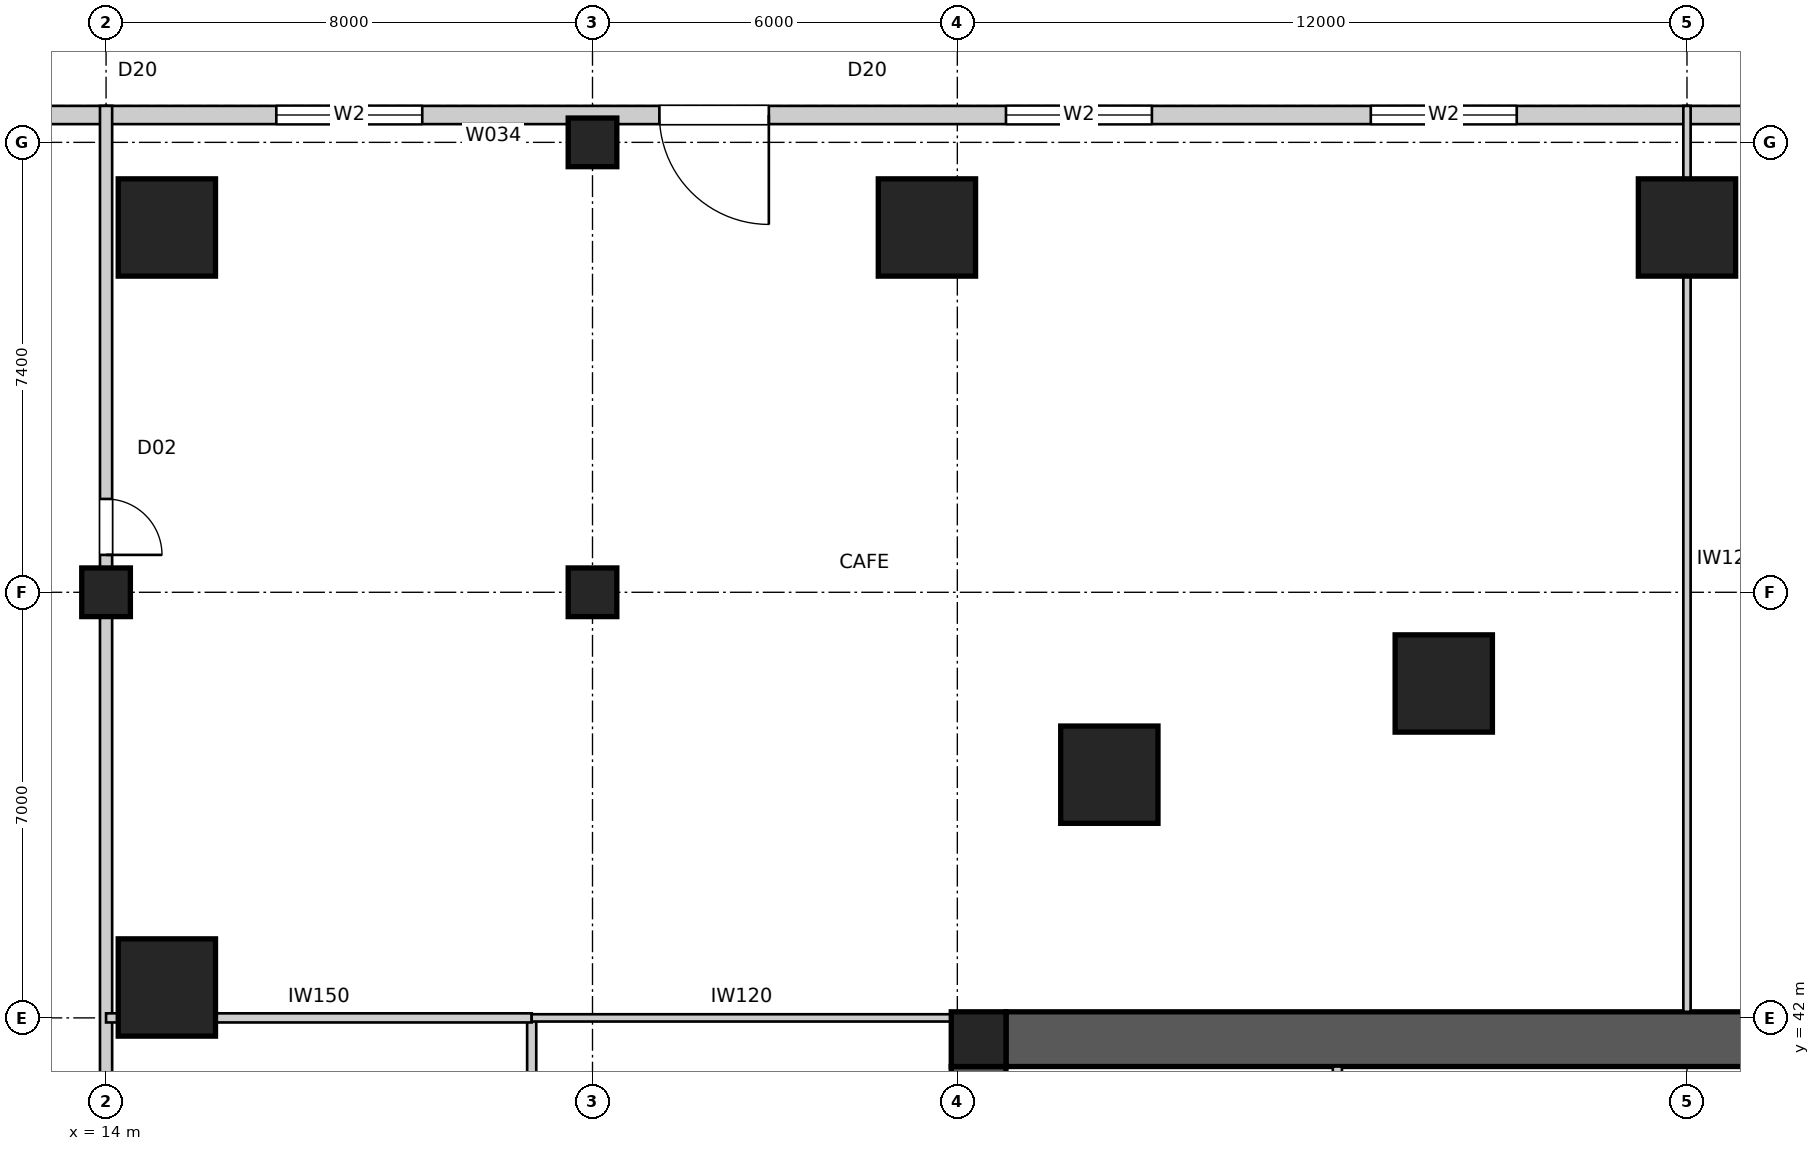
"""IFC4 building model, lengths in metres.
Left out: names, types, materials, properties, quantities, classifications, styles, units other than length and angle.
Written with IfcOpenShell. Run it as: python <this file> out.ifc"""

import sys

from ifc_helpers import new_model, si_unit, direction, frame, frame_2d, origin, origin_2d, place, context, subcontext, project, spatial, polyline, rectangle, outline, extrude, element, fill, save


model = new_model("IFC4")
c1 = context("Model", 3, precision=1e-05, world=origin(), true_north=direction((0.0, 1.0)))
c2 = subcontext(c1, "Body", "Model", "MODEL_VIEW")
j1 = project(units=[si_unit("LENGTHUNIT", "METRE"), si_unit("PLANEANGLEUNIT", "RADIAN")], contexts=[c1])
p1 = place(None, origin())
s1 = spatial("IfcSite", under=j1, at=p1, CompositionType="ELEMENT")
p2 = place(p1, origin())
s2 = spatial("IfcBuilding", under=s1, at=p2, CompositionType="ELEMENT")
p3 = place(p2, origin())
s3 = spatial("IfcBuildingStorey", under=s2, at=p3, CompositionType="ELEMENT", Elevation=0.0)
p4 = place(p3, frame((28.8, 41.65, 0.0), z_axis=(0.0, 0.0, 1.0), x_axis=(1.0, 0.0, 0.0)))
e1 = element("IfcWall", 1, at=p4, inside=s3, PredefinedType="SHEAR", context=c2, shape_type="SweptSolid", body=[
    extrude(outline(polyline([(0.0, -0.45), (22.4, -0.45), (22.4, -0.025), (22.85, -0.025), (22.85, 0.025), (22.4, 0.025), (22.4, 0.45), (0.0, 0.45), (0.0, 0.025), (-0.45, 0.025), (-0.45, -0.025), (0.0, -0.025), (0.0, -0.45)])), origin(), (0.0, 0.0, 1.0), 6.0),
])
p5 = place(p3, frame((28.35, 41.2, 0.0), z_axis=(0.0, 0.0, 1.0), x_axis=(0.0, -1.0, 0.0)))
e2 = element("IfcWall", 2, at=p5, inside=s3, PredefinedType="SHEAR", context=c2, shape_type="SweptSolid", body=[
    extrude(outline(polyline([(0.0, -0.45), (22.4, -0.45), (22.4, -0.025), (22.85, -0.025), (22.85, 0.025), (22.4, 0.025), (22.4, 0.45), (0.0, 0.45), (0.0, 0.025), (-0.45, 0.025), (-0.45, -0.025), (0.0, -0.025), (0.0, -0.45)])), origin(), (0.0, 0.0, 1.0), 6.0),
])
p6 = place(p5, frame((11.14, 0.0, 0.0)))
e3 = element("IfcOpeningElement", 3, at=p6, cuts=e2, PredefinedType="OPENING", context=c2, shape_type="SweptSolid", body=[
    extrude(rectangle(XDim=1.02, YDim=2.4, at=frame_2d((0.51, 1.2))), frame((0.0, 0.46, 0.0), z_axis=(0.0, -1.0, 0.0), x_axis=(1.0, 0.0, 0.0)), (0.0, 0.0, 1.0), 0.92),
])
p7 = place(p3, frame((28.35, 41.65, 0.0), z_axis=(0.0, 0.0, 1.0), x_axis=(1.0, 0.0, 0.0)))
e4 = element("IfcColumn", 4, at=p7, inside=s3, PredefinedType="COLUMN", context=c2, shape_type="SweptSolid", body=[
    extrude(rectangle(XDim=0.9, YDim=0.9, at=origin_2d()), origin(), (0.0, 0.0, 1.0), 6.0),
])
for number, where, z_axis, x_axis in (
    (5, (40.0, 55.0, 0.0), (0.0, 0.0, 1.0), (1.0, 0.0, 0.0)),
    (6, (27.5, 55.0, 0.0), (0.0, 0.0, 1.0), (1.0, 0.0, 0.0)),
    (7, (15.0, 55.0, 0.0), (0.0, 0.0, 1.0), (1.0, 0.0, 0.0)),
    (8, (15.0, 42.5, 0.0), (0.0, 0.0, 1.0), (1.0, 0.0, 0.0)),
):
    element("IfcColumn", number, at=place(p3, frame(where, z_axis=z_axis, x_axis=x_axis)), inside=s3, PredefinedType="COLUMN", context=c2, shape_type="SweptSolid", body=[
        extrude(rectangle(XDim=1.6, YDim=1.6, at=origin_2d()), origin(), (0.0, 0.0, 1.0), 6.0),
    ])
for number, where, z_axis, x_axis in (
    (9, (14.0, 49.0, 0.0), (0.0, 0.0, 1.0), (1.0, 0.0, 0.0)),
    (10, (22.0, 49.0, 0.0), (0.0, 0.0, 1.0), (1.0, 0.0, 0.0)),
    (11, (22.0, 56.4, 0.0), (0.0, 0.0, 1.0), (1.0, 0.0, 0.0)),
):
    element("IfcColumn", number, at=place(p3, frame(where, z_axis=z_axis, x_axis=x_axis)), inside=s3, PredefinedType="COLUMN", context=c2, shape_type="SweptSolid", body=[
        extrude(rectangle(XDim=0.8, YDim=0.8, at=origin_2d()), origin(), (0.0, 0.0, 1.0), 6.0),
    ])
for number, where, z_axis, x_axis in (
    (12, (36.0, 47.5, 0.0), (0.0, 0.0, 1.0), (1.0, 0.0, 0.0)),
    (13, (30.5, 46.0, 0.0), (0.0, 0.0, 1.0), (1.0, 0.0, 0.0)),
):
    element("IfcColumn", number, at=place(p3, frame(where, z_axis=z_axis, x_axis=x_axis)), inside=s3, PredefinedType="COLUMN", context=c2, shape_type="SweptSolid", body=[
        extrude(rectangle(XDim=1.6, YDim=1.6, at=origin_2d()), origin(), (0.0, 0.0, 1.0), 6.0),
    ])
p8 = place(p3, frame((66.0, 56.85, 0.0), z_axis=(0.0, 0.0, 1.0), x_axis=(-1.0, 0.0, 0.0)))
e14 = element("IfcWall", 14, at=p8, inside=s3, PredefinedType="SOLIDWALL", context=c2, shape_type="SweptSolid", body=[
    extrude(rectangle(XDim=26.0, YDim=0.3, at=frame_2d((13.0, 0.0))), origin(), (0.0, 0.0, 1.0), 5.65),
])
p9 = place(p8, frame((2.8, 0.0, 0.6)))
e15 = element("IfcOpeningElement", 15, at=p9, cuts=e14, PredefinedType="OPENING", context=c2, shape_type="SweptSolid", body=[
    extrude(rectangle(XDim=2.4, YDim=3.6, at=frame_2d((1.2, 1.8))), frame((0.0, 0.16, 0.0), z_axis=(0.0, -1.0, 0.0), x_axis=(1.0, 0.0, 0.0)), (0.0, 0.0, 1.0), 0.32),
])
p10 = place(p8, frame((8.8, 0.0, 0.6)))
e16 = element("IfcOpeningElement", 16, at=p10, cuts=e14, PredefinedType="OPENING", context=c2, shape_type="SweptSolid", body=[
    extrude(rectangle(XDim=2.4, YDim=3.6, at=frame_2d((1.2, 1.8))), frame((0.0, 0.16, 0.0), z_axis=(0.0, -1.0, 0.0), x_axis=(1.0, 0.0, 0.0)), (0.0, 0.0, 1.0), 0.32),
])
p11 = place(p8, frame((15.1, 0.0, 0.0)))
e17 = element("IfcOpeningElement", 17, at=p11, cuts=e14, PredefinedType="OPENING", context=c2, shape_type="SweptSolid", body=[
    extrude(rectangle(XDim=1.8, YDim=2.7, at=frame_2d((0.9, 1.35))), frame((0.0, 0.16, 0.0), z_axis=(0.0, -1.0, 0.0), x_axis=(1.0, 0.0, 0.0)), (0.0, 0.0, 1.0), 0.32),
])
p12 = place(p8, frame((20.8, 0.0, 0.6)))
e18 = element("IfcOpeningElement", 18, at=p12, cuts=e14, PredefinedType="OPENING", context=c2, shape_type="SweptSolid", body=[
    extrude(rectangle(XDim=2.4, YDim=3.6, at=frame_2d((1.2, 1.8))), frame((0.0, 0.16, 0.0), z_axis=(0.0, -1.0, 0.0), x_axis=(1.0, 0.0, 0.0)), (0.0, 0.0, 1.0), 0.32),
])
p13 = place(p3, frame((40.0, 56.85, 0.0), z_axis=(0.0, 0.0, 1.0), x_axis=(-1.0, 0.0, 0.0)))
e19 = element("IfcWall", 19, at=p13, inside=s3, PredefinedType="SOLIDWALL", context=c2, shape_type="SweptSolid", body=[
    extrude(rectangle(XDim=26.0, YDim=0.3, at=frame_2d((13.0, 0.0))), origin(), (0.0, 0.0, 1.0), 5.65),
])
p14 = place(p13, frame((2.8, 0.0, 0.6)))
e20 = element("IfcOpeningElement", 20, at=p14, cuts=e19, PredefinedType="OPENING", context=c2, shape_type="SweptSolid", body=[
    extrude(rectangle(XDim=2.4, YDim=3.6, at=frame_2d((1.2, 1.8))), frame((0.0, 0.16, 0.0), z_axis=(0.0, -1.0, 0.0), x_axis=(1.0, 0.0, 0.0)), (0.0, 0.0, 1.0), 0.32),
])
p15 = place(p13, frame((8.8, 0.0, 0.6)))
e21 = element("IfcOpeningElement", 21, at=p15, cuts=e19, PredefinedType="OPENING", context=c2, shape_type="SweptSolid", body=[
    extrude(rectangle(XDim=2.4, YDim=3.6, at=frame_2d((1.2, 1.8))), frame((0.0, 0.16, 0.0), z_axis=(0.0, -1.0, 0.0), x_axis=(1.0, 0.0, 0.0)), (0.0, 0.0, 1.0), 0.32),
])
p16 = place(p13, frame((15.1, 0.0, 0.0)))
e22 = element("IfcOpeningElement", 22, at=p16, cuts=e19, PredefinedType="OPENING", context=c2, shape_type="SweptSolid", body=[
    extrude(rectangle(XDim=1.8, YDim=2.7, at=frame_2d((0.9, 1.35))), frame((0.0, 0.16, 0.0), z_axis=(0.0, -1.0, 0.0), x_axis=(1.0, 0.0, 0.0)), (0.0, 0.0, 1.0), 0.32),
])
p17 = place(p13, frame((20.8, 0.0, 0.6)))
e23 = element("IfcOpeningElement", 23, at=p17, cuts=e19, PredefinedType="OPENING", context=c2, shape_type="SweptSolid", body=[
    extrude(rectangle(XDim=2.4, YDim=3.6, at=frame_2d((1.2, 1.8))), frame((0.0, 0.16, 0.0), z_axis=(0.0, -1.0, 0.0), x_axis=(1.0, 0.0, 0.0)), (0.0, 0.0, 1.0), 0.32),
])
p18 = place(p3, frame((14.0, 56.85, 0.0), z_axis=(0.0, 0.0, 1.0), x_axis=(-1.0, 0.0, 0.0)))
e24 = element("IfcWall", 24, at=p18, inside=s3, PredefinedType="SOLIDWALL", context=c2, shape_type="SweptSolid", body=[
    extrude(rectangle(XDim=12.0, YDim=0.3, at=frame_2d((6.0, 0.0))), origin(), (0.0, 0.0, 1.0), 5.65),
])
p19 = place(p18, frame((1.1, 0.0, 0.0)))
e25 = element("IfcOpeningElement", 25, at=p19, cuts=e24, PredefinedType="OPENING", context=c2, shape_type="SweptSolid", body=[
    extrude(rectangle(XDim=1.8, YDim=2.7, at=frame_2d((0.9, 1.35))), frame((0.0, 0.16, 0.0), z_axis=(0.0, -1.0, 0.0), x_axis=(1.0, 0.0, 0.0)), (0.0, 0.0, 1.0), 0.32),
])
p20 = place(p18, frame((5.1, 0.0, 0.0)))
e26 = element("IfcOpeningElement", 26, at=p20, cuts=e24, PredefinedType="OPENING", context=c2, shape_type="SweptSolid", body=[
    extrude(rectangle(XDim=1.8, YDim=2.7, at=frame_2d((0.9, 1.35))), frame((0.0, 0.16, 0.0), z_axis=(0.0, -1.0, 0.0), x_axis=(1.0, 0.0, 0.0)), (0.0, 0.0, 1.0), 0.32),
])
p21 = place(p18, frame((9.1, 0.0, 0.0)))
e27 = element("IfcOpeningElement", 27, at=p21, cuts=e24, PredefinedType="OPENING", context=c2, shape_type="SweptSolid", body=[
    extrude(rectangle(XDim=1.8, YDim=2.7, at=frame_2d((0.9, 1.35))), frame((0.0, 0.16, 0.0), z_axis=(0.0, -1.0, 0.0), x_axis=(1.0, 0.0, 0.0)), (0.0, 0.0, 1.0), 0.32),
])
p22 = place(p3, frame((34.25, 41.2, 0.0), z_axis=(0.0, 0.0, 1.0), x_axis=(0.0, -1.0, 0.0)))
e28 = element("IfcWall", 28, at=p22, inside=s3, PredefinedType="SOLIDWALL", context=c2, shape_type="SweptSolid", body=[
    extrude(rectangle(XDim=5.95, YDim=0.15, at=frame_2d((2.975, 0.0))), origin(), (0.0, 0.0, 1.0), 5.65),
])
p23 = place(p22, frame((2.515, 0.0, 0.0)))
e29 = element("IfcOpeningElement", 29, at=p23, cuts=e28, PredefinedType="OPENING", context=c2, shape_type="SweptSolid", body=[
    extrude(rectangle(XDim=0.92, YDim=2.1, at=frame_2d((0.46, 1.05))), frame((0.0, 0.085, 0.0), z_axis=(0.0, -1.0, 0.0), x_axis=(1.0, 0.0, 0.0)), (0.0, 0.0, 1.0), 0.17),
])
p24 = place(p3, frame((14.0, 57.0, 0.0), z_axis=(0.0, 0.0, 1.0), x_axis=(0.0, -1.0, 0.0)))
e30 = element("IfcWall", 30, at=p24, inside=s3, PredefinedType="PARTITIONING", context=c2, shape_type="SweptSolid", body=[
    extrude(rectangle(XDim=54.0, YDim=0.2, at=frame_2d((27.0, 0.0))), origin(), (0.0, 0.0, 1.0), 5.65),
])
p25 = place(p24, frame((29.49, 0.0, 0.0)))
e31 = element("IfcOpeningElement", 31, at=p25, cuts=e30, PredefinedType="OPENING", context=c2, shape_type="SweptSolid", body=[
    extrude(rectangle(XDim=1.02, YDim=2.4, at=frame_2d((0.51, 1.2))), frame((0.0, 0.11, 0.0), z_axis=(0.0, -1.0, 0.0), x_axis=(1.0, 0.0, 0.0)), (0.0, 0.0, 1.0), 0.22),
])
p26 = place(p24, frame((46.615, 0.0, 0.0)))
e32 = element("IfcOpeningElement", 32, at=p26, cuts=e30, PredefinedType="OPENING", context=c2, shape_type="SweptSolid", body=[
    extrude(rectangle(XDim=0.92, YDim=2.34, at=frame_2d((0.46, 1.17))), frame((0.0, 0.11, 0.0), z_axis=(0.0, -1.0, 0.0), x_axis=(1.0, 0.0, 0.0)), (0.0, 0.0, 1.0), 0.22),
])
p27 = place(p24, frame((6.465, 0.0, 0.0)))
e33 = element("IfcOpeningElement", 33, at=p27, cuts=e30, PredefinedType="OPENING", context=c2, shape_type="SweptSolid", body=[
    extrude(rectangle(XDim=0.92, YDim=2.34, at=frame_2d((0.46, 1.17))), frame((0.0, 0.11, 0.0), z_axis=(0.0, -1.0, 0.0), x_axis=(1.0, 0.0, 0.0)), (0.0, 0.0, 1.0), 0.22),
])
p28 = place(p24, frame((17.49, 0.0, 0.0)))
e34 = element("IfcOpeningElement", 34, at=p28, cuts=e30, PredefinedType="OPENING", context=c2, shape_type="SweptSolid", body=[
    extrude(rectangle(XDim=1.02, YDim=2.1, at=frame_2d((0.51, 1.05))), frame((0.0, 0.11, 0.0), z_axis=(0.0, -1.0, 0.0), x_axis=(1.0, 0.0, 0.0)), (0.0, 0.0, 1.0), 0.22),
])
p29 = place(p3, frame((21.0, 42.0, 0.0), z_axis=(0.0, 0.0, 1.0), x_axis=(0.0, -1.0, 0.0)))
e35 = element("IfcWall", 35, at=p29, inside=s3, PredefinedType="SOLIDWALL", context=c2, shape_type="SweptSolid", body=[
    extrude(rectangle(XDim=6.0, YDim=0.15, at=frame_2d((3.0, 0.0))), origin(), (0.0, 0.0, 1.0), 5.65),
])
p30 = place(p3, frame((14.0, 42.0, 0.0), z_axis=(0.0, 0.0, 1.0), x_axis=(1.0, 0.0, 0.0)))
e36 = element("IfcWall", 36, at=p30, inside=s3, PredefinedType="SOLIDWALL", context=c2, shape_type="SweptSolid", body=[
    extrude(rectangle(XDim=7.0, YDim=0.15, at=frame_2d((3.5, 0.0))), origin(), (0.0, 0.0, 1.0), 5.65),
])
p31 = place(p3, frame((21.0, 42.0, 0.0), z_axis=(0.0, 0.0, 1.0), x_axis=(1.0, 0.0, 0.0)))
e37 = element("IfcWall", 37, at=p31, inside=s3, PredefinedType="PARTITIONING", context=c2, shape_type="SweptSolid", body=[
    extrude(rectangle(XDim=6.9, YDim=0.12, at=frame_2d((3.45, 0.0))), origin(), (0.0, 0.0, 1.0), 5.65),
])
p32 = place(p3, frame((40.0, 57.0, 0.0), z_axis=(0.0, 0.0, 1.0), x_axis=(0.0, -1.0, 0.0)))
e38 = element("IfcWall", 38, at=p32, inside=s3, PredefinedType="PARTITIONING", context=c2, shape_type="SweptSolid", body=[
    extrude(rectangle(XDim=14.9, YDim=0.12, at=frame_2d((7.45, 0.0))), origin(), (0.0, 0.0, 1.0), 5.65),
])
p33 = place(p14, origin())
e39 = element("IfcWindow", 39, at=p33, inside=s3, PartitioningType="SINGLE_PANEL", PredefinedType="WINDOW", context=c2, shape_type="SweptSolid", body=[
    extrude(rectangle(XDim=2.4, YDim=3.6, at=frame_2d((1.2, 1.8))), frame((0.0, 0.03, 0.0), z_axis=(0.0, -1.0, 0.0), x_axis=(1.0, 0.0, 0.0)), (0.0, 0.0, 1.0), 0.06),
])
fill(e20, e39)
p34 = place(p15, origin())
e40 = element("IfcWindow", 40, at=p34, inside=s3, PartitioningType="SINGLE_PANEL", PredefinedType="WINDOW", context=c2, shape_type="SweptSolid", body=[
    extrude(rectangle(XDim=2.4, YDim=3.6, at=frame_2d((1.2, 1.8))), frame((0.0, 0.03, 0.0), z_axis=(0.0, -1.0, 0.0), x_axis=(1.0, 0.0, 0.0)), (0.0, 0.0, 1.0), 0.06),
])
fill(e21, e40)
p35 = place(p16, origin())
e41 = element("IfcDoor", 41, at=p35, inside=s3, OperationType="DOUBLE_DOOR_DOUBLE_SWING", PredefinedType="DOOR", context=c2, shape_type="SweptSolid", body=[
    extrude(rectangle(XDim=1.8, YDim=2.7, at=frame_2d((0.9, 1.35))), frame((0.0, 0.025, 0.0), z_axis=(0.0, -1.0, 0.0), x_axis=(1.0, 0.0, 0.0)), (0.0, 0.0, 1.0), 0.05),
])
fill(e22, e41)
p36 = place(p17, origin())
e42 = element("IfcWindow", 42, at=p36, inside=s3, PartitioningType="SINGLE_PANEL", PredefinedType="WINDOW", context=c2, shape_type="SweptSolid", body=[
    extrude(rectangle(XDim=2.4, YDim=3.6, at=frame_2d((1.2, 1.8))), frame((0.0, 0.03, 0.0), z_axis=(0.0, -1.0, 0.0), x_axis=(1.0, 0.0, 0.0)), (0.0, 0.0, 1.0), 0.06),
])
fill(e23, e42)
p37 = place(p27, origin())
e43 = element("IfcDoor", 43, at=p37, inside=s3, OperationType="SINGLE_SWING_RIGHT", PredefinedType="DOOR", context=c2, shape_type="SweptSolid", body=[
    extrude(rectangle(XDim=0.92, YDim=2.34, at=frame_2d((0.46, 1.17))), frame((0.0, 0.025, 0.0), z_axis=(0.0, -1.0, 0.0), x_axis=(1.0, 0.0, 0.0)), (0.0, 0.0, 1.0), 0.05),
])
fill(e33, e43)
save(model, sys.argv[1])
